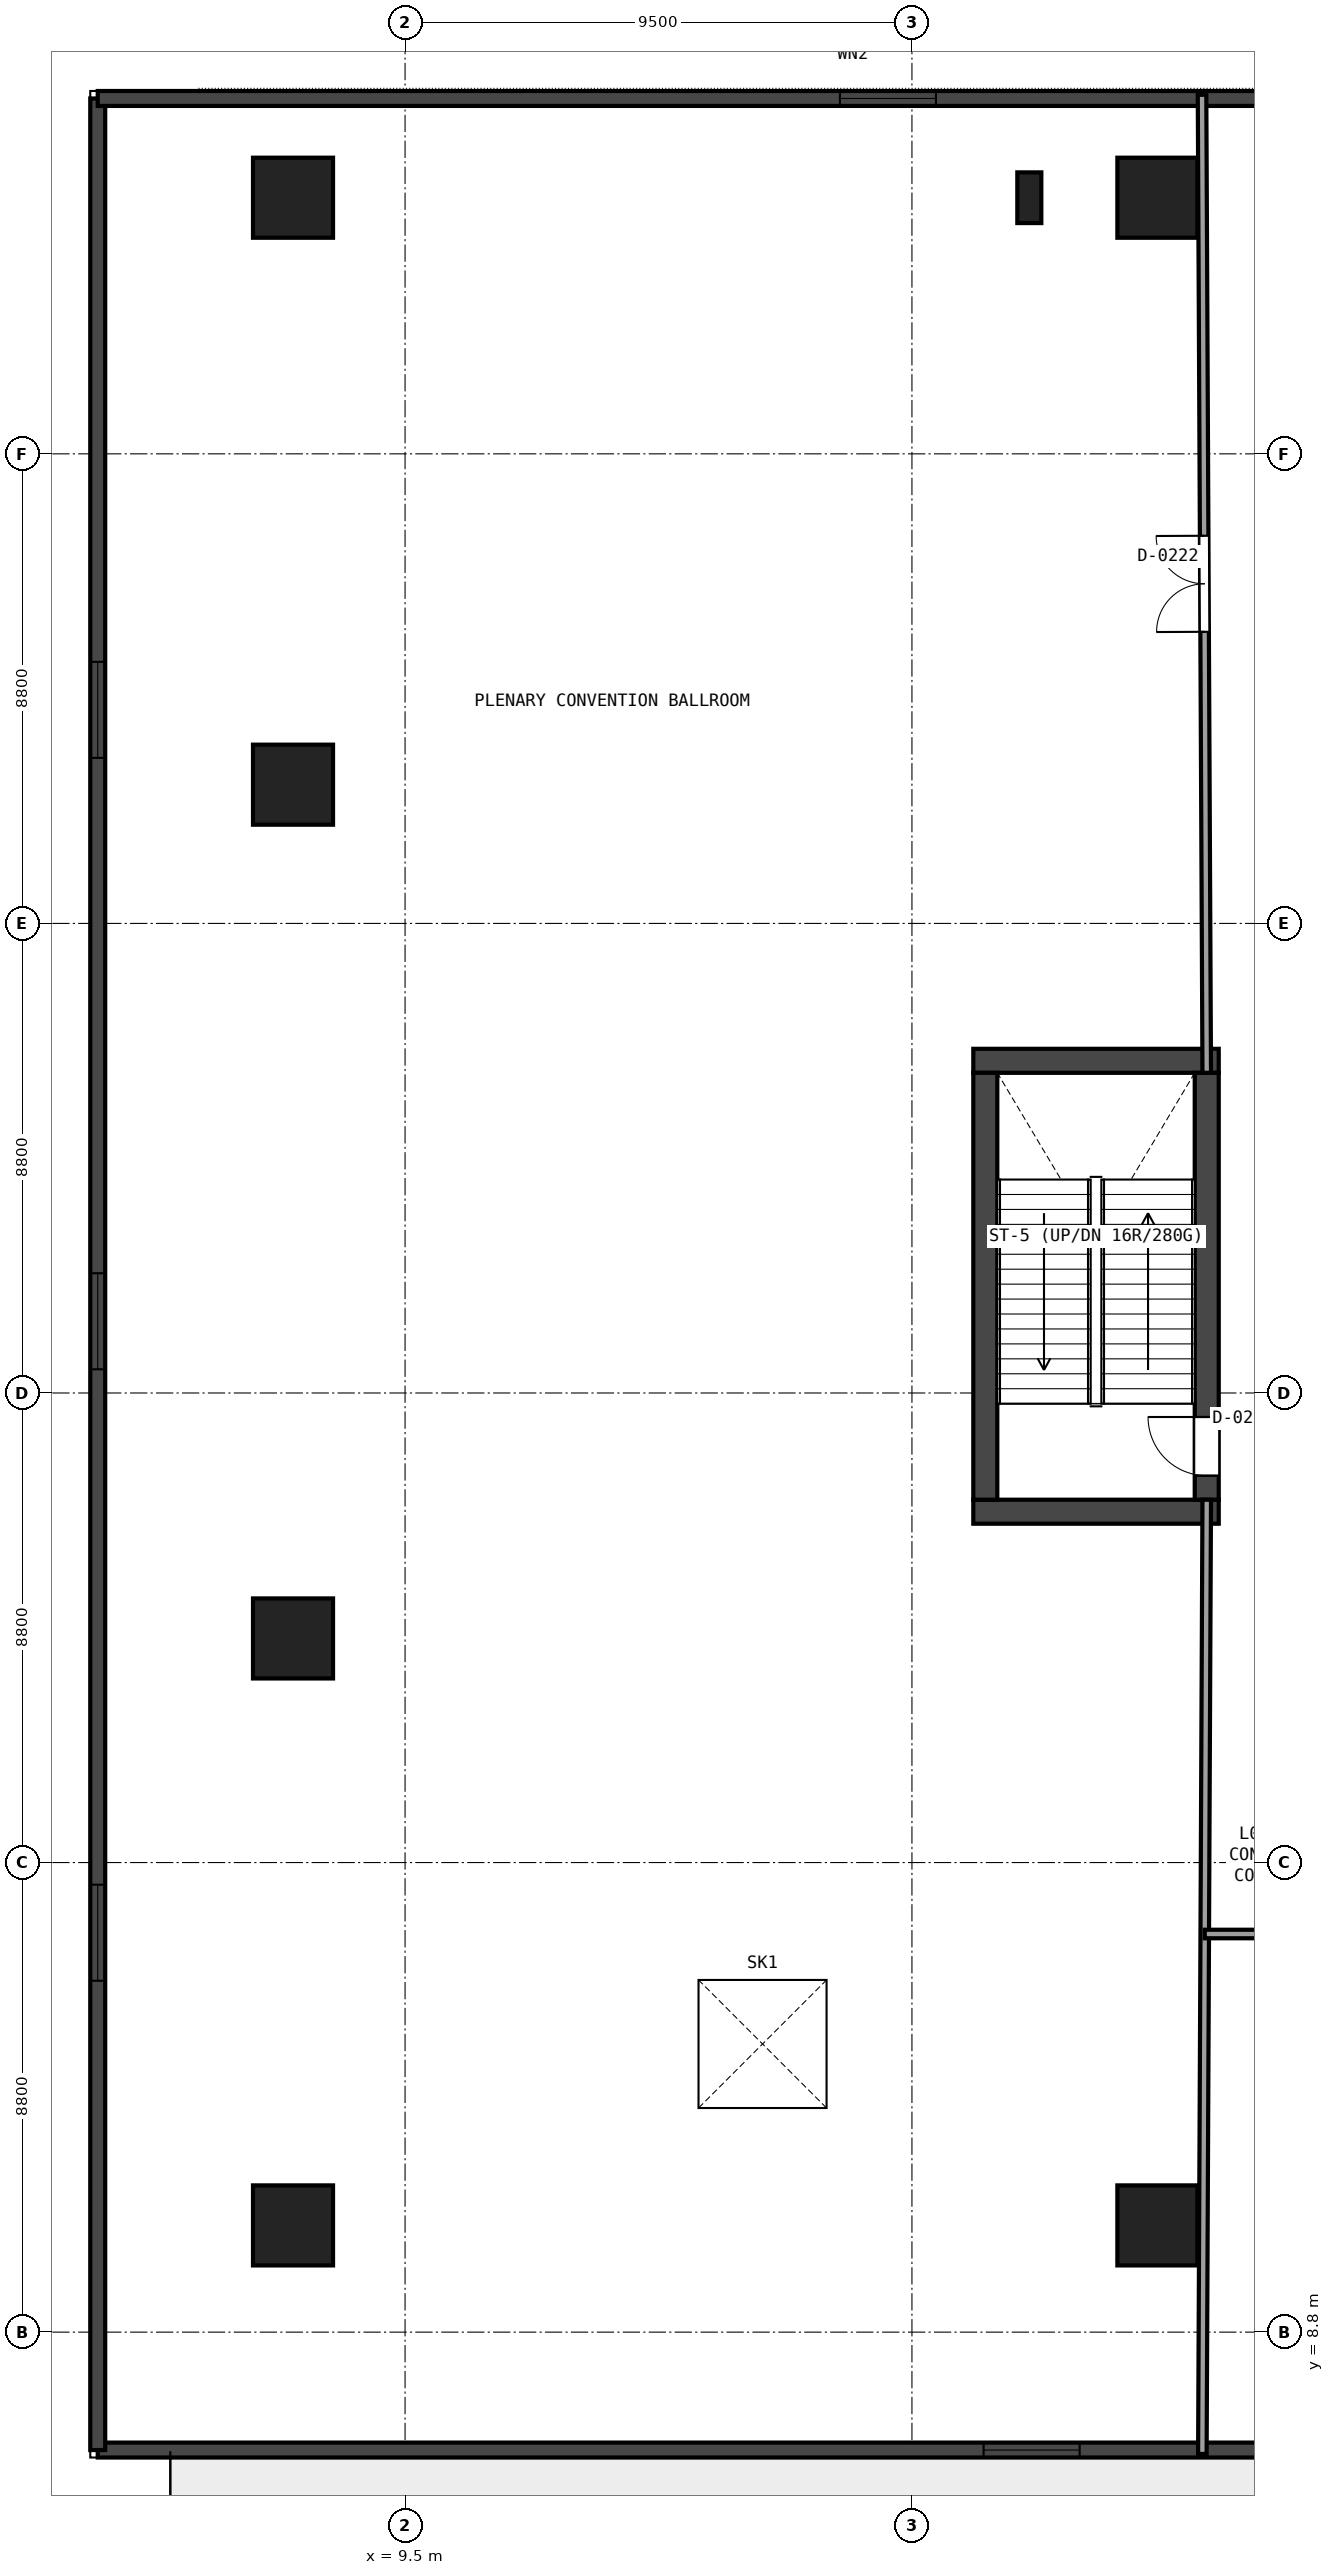
"""IFC4 building model, lengths in metres.
Left out: names, types, materials, properties, quantities, classifications, styles, units other than length and angle.
Written with IfcOpenShell. Run it as: python <this file> out.ifc"""

import sys

from ifc_helpers import new_model, si_unit, direction, frame, frame_2d, origin, origin_2d, place, context, subcontext, project, spatial, rectangle, extrude, element, fill, save


model = new_model("IFC4")
c1 = context("Model", 3, precision=1e-05, world=origin(), true_north=direction((0.0, 1.0)))
c2 = subcontext(c1, "Body", "Model", "MODEL_VIEW")
j1 = project(units=[si_unit("LENGTHUNIT", "METRE"), si_unit("PLANEANGLEUNIT", "RADIAN")], contexts=[c1])
p1 = place(None, origin())
s1 = spatial("IfcSite", under=j1, at=p1, CompositionType="ELEMENT")
p2 = place(p1, origin())
s2 = spatial("IfcBuilding", under=s1, at=p2, CompositionType="ELEMENT")
p3 = place(p2, frame((0.0, 0.0, 10.8)))
s3 = spatial("IfcBuildingStorey", under=s2, at=p3, CompositionType="ELEMENT", Elevation=10.8)
for number, where, z_axis, x_axis in (
    (1, (20.15, 24.175, 0.0), (0.0, 0.0, 1.0), (1.0, 0.0, 0.0)),
    (2, (20.15, 32.625, 0.0), (0.0, 0.0, 1.0), (1.0, 0.0, 0.0)),
):
    element("IfcWall", number, at=place(p3, frame(where, z_axis=z_axis, x_axis=x_axis)), inside=s3, PredefinedType="SHEAR", context=c2, shape_type="SweptSolid", body=[
        extrude(rectangle(XDim=4.6, YDim=0.45, at=frame_2d((2.3, 0.0))), origin(), (0.0, 0.0, 1.0), 5.05),
    ])
p4 = place(p3, frame((20.375, 24.4, 0.0), z_axis=(0.0, 0.0, 1.0), x_axis=(0.0, 1.0, 0.0)))
e3 = element("IfcWall", 3, at=p4, inside=s3, PredefinedType="SHEAR", context=c2, shape_type="SweptSolid", body=[
    extrude(rectangle(XDim=8.0, YDim=0.45, at=frame_2d((4.0, 0.0))), origin(), (0.0, 0.0, 1.0), 5.05),
])
p5 = place(p3, frame((24.525, 24.4, 0.0), z_axis=(0.0, 0.0, 1.0), x_axis=(0.0, 1.0, 0.0)))
e4 = element("IfcWall", 4, at=p5, inside=s3, PredefinedType="SHEAR", context=c2, shape_type="SweptSolid", body=[
    extrude(rectangle(XDim=8.0, YDim=0.45, at=frame_2d((4.0, 0.0))), origin(), (0.0, 0.0, 1.0), 5.05),
])
p6 = place(p5, frame((0.45, 0.0, 0.0)))
e5 = element("IfcOpeningElement", 5, at=p6, cuts=e4, PredefinedType="OPENING", context=c2, shape_type="SweptSolid", body=[
    extrude(rectangle(XDim=1.1, YDim=2.15, at=frame_2d((0.55, 1.075))), frame((0.0, 0.235, 0.0), z_axis=(0.0, -1.0, 0.0), x_axis=(1.0, 0.0, 0.0)), (0.0, 0.0, 1.0), 0.47),
])
for number, where, z_axis, x_axis in (
    (6, (7.4, 10.8, 0.0), (0.0, 0.0, 1.0), (1.0, 0.0, 0.0)),
    (7, (23.6, 10.8, 0.0), (0.0, 0.0, 1.0), (1.0, 0.0, 0.0)),
    (8, (23.6, 48.8, 0.0), (0.0, 0.0, 1.0), (1.0, 0.0, 0.0)),
    (9, (7.4, 48.8, 0.0), (0.0, 0.0, 1.0), (1.0, 0.0, 0.0)),
    (10, (7.4, 37.8, 0.0), (0.0, 0.0, 1.0), (1.0, 0.0, 0.0)),
    (11, (7.4, 21.8, 0.0), (0.0, 0.0, 1.0), (1.0, 0.0, 0.0)),
):
    element("IfcColumn", number, at=place(p3, frame(where, z_axis=z_axis, x_axis=x_axis)), inside=s3, PredefinedType="COLUMN", context=c2, shape_type="SweptSolid", body=[
        extrude(rectangle(XDim=1.5, YDim=1.5, at=origin_2d()), origin(), (0.0, 0.0, 1.0), 5.05),
    ])
p7 = place(p3, frame((21.2, 48.8, 0.0), z_axis=(0.0, 0.0, 1.0), x_axis=(1.0, 0.0, 0.0)))
e12 = element("IfcColumn", 12, at=p7, inside=s3, PredefinedType="PILASTER", context=c2, shape_type="SweptSolid", body=[
    extrude(rectangle(XDim=0.45, YDim=0.95, at=origin_2d()), origin(), (0.0, 0.0, 1.0), 5.05),
])
p8 = place(p3, frame((71.06, 6.59, 0.0), z_axis=(0.0, 0.0, 1.0), x_axis=(-1.0, 0.0, 0.0)))
e13 = element("IfcWall", 13, at=p8, inside=s3, PredefinedType="SOLIDWALL", context=c2, shape_type="SweptSolid", body=[
    extrude(rectangle(XDim=67.32, YDim=0.28, at=frame_2d((33.66, 0.0))), origin(), (0.0, 0.0, 1.0), 5.05),
])
p9 = place(p8, frame((13.91, 0.0, 0.95)))
e14 = element("IfcOpeningElement", 14, at=p9, cuts=e13, PredefinedType="OPENING", context=c2, shape_type="SweptSolid", body=[
    extrude(rectangle(XDim=1.8, YDim=2.3, at=frame_2d((0.9, 1.15))), frame((0.0, 0.15, 0.0), z_axis=(0.0, -1.0, 0.0), x_axis=(1.0, 0.0, 0.0)), (0.0, 0.0, 1.0), 0.3),
])
p10 = place(p8, frame((48.917, 0.0, 0.95)))
e15 = element("IfcOpeningElement", 15, at=p10, cuts=e13, PredefinedType="OPENING", context=c2, shape_type="SweptSolid", body=[
    extrude(rectangle(XDim=1.8, YDim=2.3, at=frame_2d((0.9, 1.15))), frame((0.0, 0.15, 0.0), z_axis=(0.0, -1.0, 0.0), x_axis=(1.0, 0.0, 0.0)), (0.0, 0.0, 1.0), 0.3),
])
p11 = place(p8, frame((35.46, 0.0, 0.0)))
e16 = element("IfcOpeningElement", 16, at=p11, cuts=e13, PredefinedType="OPENING", context=c2, shape_type="SweptSolid", body=[
    extrude(rectangle(XDim=1.2, YDim=2.2, at=frame_2d((0.6, 1.1))), frame((0.0, 0.15, 0.0), z_axis=(0.0, -1.0, 0.0), x_axis=(1.0, 0.0, 0.0)), (0.0, 0.0, 1.0), 0.3),
])
p12 = place(p3, frame((3.74, 6.59, 0.0), z_axis=(0.0, 0.0, 1.0), x_axis=(0.0, 1.0, 0.0)))
e17 = element("IfcWall", 17, at=p12, inside=s3, PredefinedType="SOLIDWALL", context=c2, shape_type="SweptSolid", body=[
    extrude(rectangle(XDim=44.07, YDim=0.28, at=frame_2d((22.035, 0.0))), origin(), (0.0, 0.0, 1.0), 5.05),
])
p13 = place(p12, frame((8.795, 0.0, 0.95)))
e18 = element("IfcOpeningElement", 18, at=p13, cuts=e17, PredefinedType="OPENING", context=c2, shape_type="SweptSolid", body=[
    extrude(rectangle(XDim=1.8, YDim=2.3, at=frame_2d((0.9, 1.15))), frame((0.0, 0.15, 0.0), z_axis=(0.0, -1.0, 0.0), x_axis=(1.0, 0.0, 0.0)), (0.0, 0.0, 1.0), 0.3),
])
p14 = place(p12, frame((20.254, 0.0, 0.95)))
e19 = element("IfcOpeningElement", 19, at=p14, cuts=e17, PredefinedType="OPENING", context=c2, shape_type="SweptSolid", body=[
    extrude(rectangle(XDim=1.8, YDim=2.3, at=frame_2d((0.9, 1.15))), frame((0.0, 0.15, 0.0), z_axis=(0.0, -1.0, 0.0), x_axis=(1.0, 0.0, 0.0)), (0.0, 0.0, 1.0), 0.3),
])
p15 = place(p12, frame((31.712, 0.0, 0.95)))
e20 = element("IfcOpeningElement", 20, at=p15, cuts=e17, PredefinedType="OPENING", context=c2, shape_type="SweptSolid", body=[
    extrude(rectangle(XDim=1.8, YDim=2.3, at=frame_2d((0.9, 1.15))), frame((0.0, 0.15, 0.0), z_axis=(0.0, -1.0, 0.0), x_axis=(1.0, 0.0, 0.0)), (0.0, 0.0, 1.0), 0.3),
])
p16 = place(p3, frame((3.74, 50.66, 0.0), z_axis=(0.0, 0.0, 1.0), x_axis=(1.0, 0.0, 0.0)))
e21 = element("IfcWall", 21, at=p16, inside=s3, PredefinedType="SOLIDWALL", context=c2, shape_type="SweptSolid", body=[
    extrude(rectangle(XDim=67.32, YDim=0.28, at=frame_2d((33.66, 0.0))), origin(), (0.0, 0.0, 1.0), 5.05),
])
p17 = place(p16, frame((13.91, 0.0, 0.95)))
e22 = element("IfcOpeningElement", 22, at=p17, cuts=e21, PredefinedType="OPENING", context=c2, shape_type="SweptSolid", body=[
    extrude(rectangle(XDim=1.8, YDim=2.3, at=frame_2d((0.9, 1.15))), frame((0.0, 0.15, 0.0), z_axis=(0.0, -1.0, 0.0), x_axis=(1.0, 0.0, 0.0)), (0.0, 0.0, 1.0), 0.3),
])
p18 = place(p16, frame((31.414, 0.0, 0.95)))
e23 = element("IfcOpeningElement", 23, at=p18, cuts=e21, PredefinedType="OPENING", context=c2, shape_type="SweptSolid", body=[
    extrude(rectangle(XDim=1.8, YDim=2.3, at=frame_2d((0.9, 1.15))), frame((0.0, 0.15, 0.0), z_axis=(0.0, -1.0, 0.0), x_axis=(1.0, 0.0, 0.0)), (0.0, 0.0, 1.0), 0.3),
])
p19 = place(p3, frame((24.443, 6.517, 0.0), z_axis=(0.0, 0.0, 1.0), x_axis=(0.004573455882, 0.999989541696, 0.0)))
e24 = element("IfcWall", 24, at=p19, inside=s3, PredefinedType="PARTITIONING", context=c2, shape_type="SweptSolid", body=[
    extrude(rectangle(XDim=17.883, YDim=0.16, at=frame_2d((8.941, 0.0))), origin(), (0.0, 0.0, 1.0), 4.135),
])
p20 = place(p3, frame((24.525, 32.4, 0.0), z_axis=(0.0, 0.0, 1.0), x_axis=(-0.004795085797, 0.99998850351, 0.0)))
e25 = element("IfcWall", 25, at=p20, inside=s3, PredefinedType="PARTITIONING", context=c2, shape_type="SweptSolid", body=[
    extrude(rectangle(XDim=18.329, YDim=0.16, at=frame_2d((9.165, 0.0))), origin(), (0.0, 0.0, 1.0), 4.135),
])
p21 = place(p20, frame((8.265, 0.0, 0.0)))
e26 = element("IfcOpeningElement", 26, at=p21, cuts=e25, PredefinedType="OPENING", context=c2, shape_type="SweptSolid", body=[
    extrude(rectangle(XDim=1.8, YDim=2.25, at=frame_2d((0.9, 1.125))), frame((0.0, 0.09, 0.0), z_axis=(0.0, -1.0, 0.0), x_axis=(1.0, 0.0, 0.0)), (0.0, 0.0, 1.0), 0.18),
])
p22 = place(p3, frame((57.4, 16.26, 0.0), z_axis=(0.0, 0.0, 1.0), x_axis=(-0.99999999956, 2.967205e-05, 0.0)))
e27 = element("IfcWall", 27, at=p22, inside=s3, PredefinedType="PARTITIONING", context=c2, shape_type="SweptSolid", body=[
    extrude(rectangle(XDim=32.912, YDim=0.16, at=frame_2d((16.456, 0.0))), origin(), (0.0, 0.0, 1.0), 4.203),
])
p23 = place(p22, frame((15.956, 0.0, 0.0)))
e28 = element("IfcOpeningElement", 28, at=p23, cuts=e27, PredefinedType="OPENING", context=c2, shape_type="SweptSolid", body=[
    extrude(rectangle(XDim=1.0, YDim=2.15, at=frame_2d((0.5, 1.075))), frame((0.0, 0.09, 0.0), z_axis=(0.0, -1.0, 0.0), x_axis=(1.0, 0.0, 0.0)), (0.0, 0.0, 1.0), 0.18),
])
p24 = place(p17, origin())
e29 = element("IfcWindow", 29, at=p24, inside=s3, PartitioningType="SINGLE_PANEL", PredefinedType="WINDOW", context=c2, shape_type="SweptSolid", body=[
    extrude(rectangle(XDim=1.8, YDim=2.3, at=frame_2d((0.9, 1.15))), frame((0.0, 0.03, 0.0), z_axis=(0.0, -1.0, 0.0), x_axis=(1.0, 0.0, 0.0)), (0.0, 0.0, 1.0), 0.06),
])
fill(e22, e29)
p25 = place(p10, origin())
e30 = element("IfcWindow", 30, at=p25, inside=s3, PartitioningType="SINGLE_PANEL", PredefinedType="WINDOW", context=c2, shape_type="SweptSolid", body=[
    extrude(rectangle(XDim=1.8, YDim=2.3, at=frame_2d((0.9, 1.15))), frame((0.0, 0.03, 0.0), z_axis=(0.0, -1.0, 0.0), x_axis=(1.0, 0.0, 0.0)), (0.0, 0.0, 1.0), 0.06),
])
fill(e15, e30)
p26 = place(p13, origin())
e31 = element("IfcWindow", 31, at=p26, inside=s3, PartitioningType="SINGLE_PANEL", PredefinedType="WINDOW", context=c2, shape_type="SweptSolid", body=[
    extrude(rectangle(XDim=1.8, YDim=2.3, at=frame_2d((0.9, 1.15))), frame((0.0, 0.03, 0.0), z_axis=(0.0, -1.0, 0.0), x_axis=(1.0, 0.0, 0.0)), (0.0, 0.0, 1.0), 0.06),
])
fill(e18, e31)
p27 = place(p14, origin())
e32 = element("IfcWindow", 32, at=p27, inside=s3, PartitioningType="SINGLE_PANEL", PredefinedType="WINDOW", context=c2, shape_type="SweptSolid", body=[
    extrude(rectangle(XDim=1.8, YDim=2.3, at=frame_2d((0.9, 1.15))), frame((0.0, 0.03, 0.0), z_axis=(0.0, -1.0, 0.0), x_axis=(1.0, 0.0, 0.0)), (0.0, 0.0, 1.0), 0.06),
])
fill(e19, e32)
p28 = place(p15, origin())
e33 = element("IfcWindow", 33, at=p28, inside=s3, PartitioningType="SINGLE_PANEL", PredefinedType="WINDOW", context=c2, shape_type="SweptSolid", body=[
    extrude(rectangle(XDim=1.8, YDim=2.3, at=frame_2d((0.9, 1.15))), frame((0.0, 0.03, 0.0), z_axis=(0.0, -1.0, 0.0), x_axis=(1.0, 0.0, 0.0)), (0.0, 0.0, 1.0), 0.06),
])
fill(e20, e33)
p29 = place(p3, frame((0.0, 0.0, -0.35)))
p30 = place(p29, frame((16.2, 14.2, 0.0)))
p31 = place(p30, frame((0.0, 0.0, 0.3)))
e34 = element("IfcWindow", 34, at=p31, inside=s3, PartitioningType="SINGLE_PANEL", PredefinedType="SKYLIGHT", context=c2, shape_type="SweptSolid", body=[
    extrude(rectangle(XDim=2.4, YDim=2.4, at=origin_2d()), origin(), (0.0, 0.0, 1.0), 0.05),
])
p32 = place(p6, origin())
e35 = element("IfcDoor", 35, at=p32, inside=s3, OperationType="SINGLE_SWING_RIGHT", PredefinedType="DOOR", context=c2, shape_type="SweptSolid", body=[
    extrude(rectangle(XDim=1.1, YDim=2.15, at=frame_2d((0.55, 1.075))), frame((0.0, 0.025, 0.0), z_axis=(0.0, -1.0, 0.0), x_axis=(1.0, 0.0, 0.0)), (0.0, 0.0, 1.0), 0.05),
])
fill(e5, e35)
p33 = place(p21, origin())
e36 = element("IfcDoor", 36, at=p33, inside=s3, OperationType="DOUBLE_DOOR_SINGLE_SWING", PredefinedType="DOOR", context=c2, shape_type="SweptSolid", body=[
    extrude(rectangle(XDim=1.8, YDim=2.25, at=frame_2d((0.9, 1.125))), frame((0.0, 0.025, 0.0), z_axis=(0.0, -1.0, 0.0), x_axis=(1.0, 0.0, 0.0)), (0.0, 0.0, 1.0), 0.05),
])
fill(e26, e36)
save(model, sys.argv[1])
